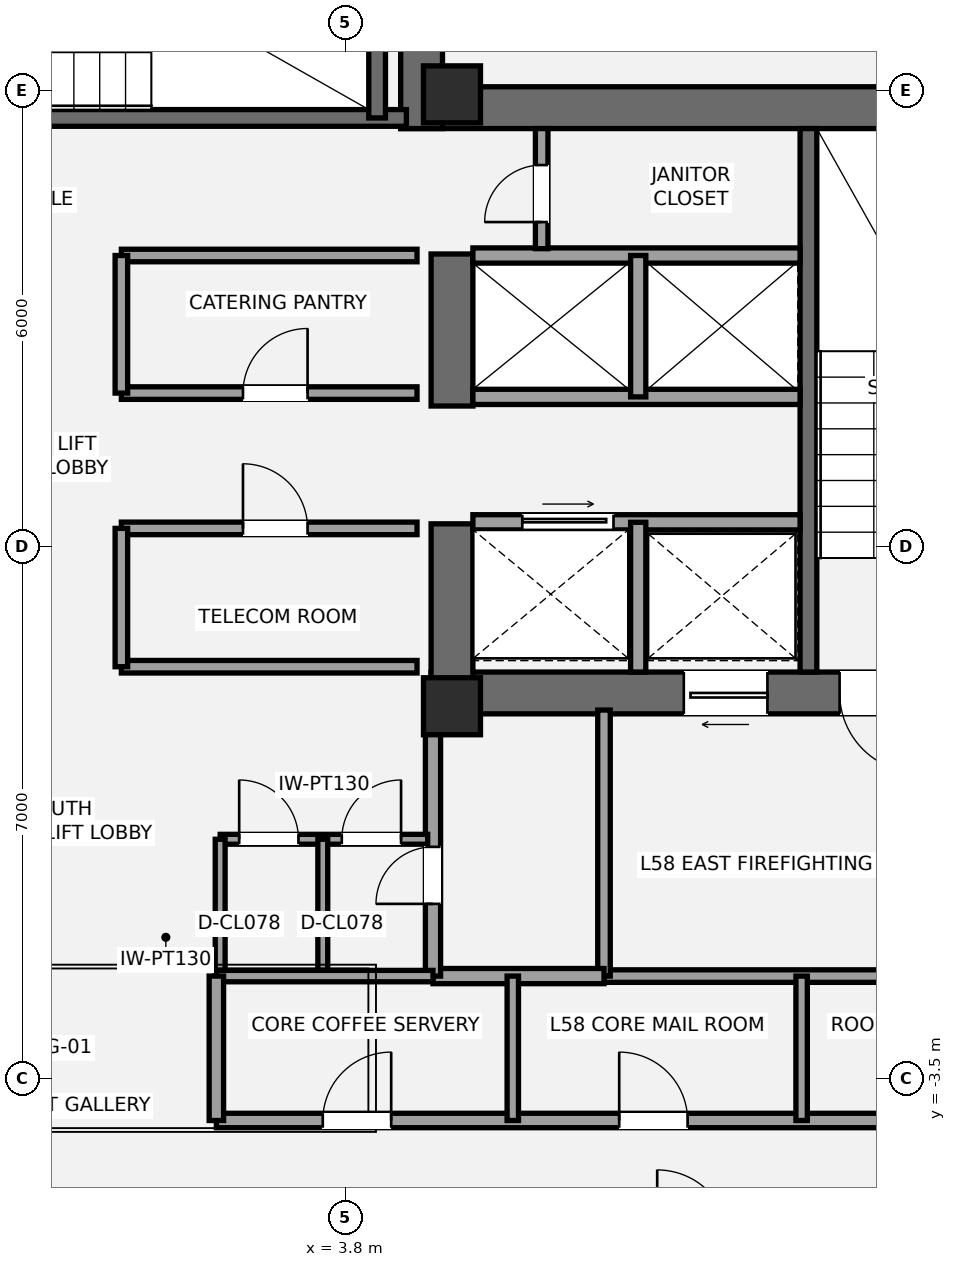
"""IFC4 building model, lengths in metres.
Left out: names, types, materials, properties, quantities, classifications, styles, units other than length and angle.
Written with IfcOpenShell. Run it as: python <this file> out.ifc"""

import sys

from ifc_helpers import new_model, si_unit, direction, frame, frame_2d, origin, origin_2d, place, context, subcontext, project, spatial, rectangle, extrude, element, fill, save


model = new_model("IFC4")
c1 = context("Model", 3, precision=1e-05, world=origin(), true_north=direction((0.0, 1.0)))
c2 = subcontext(c1, "Body", "Model", "MODEL_VIEW")
j1 = project(units=[si_unit("LENGTHUNIT", "METRE"), si_unit("PLANEANGLEUNIT", "RADIAN")], contexts=[c1])
p1 = place(None, origin())
s1 = spatial("IfcSite", under=j1, at=p1, CompositionType="ELEMENT")
p2 = place(p1, origin())
s2 = spatial("IfcBuilding", under=s1, at=p2, CompositionType="ELEMENT")
p3 = place(p2, frame((0.0, 0.0, 210.0)))
s3 = spatial("IfcBuildingStorey", under=s2, at=p3, CompositionType="ELEMENT", Elevation=210.0)
p4 = place(p3, frame((4.525, 9.275, 0.0), z_axis=(0.0, 0.0, 1.0), x_axis=(1.0, 0.0, 0.0)))
e1 = element("IfcWall", 1, at=p4, inside=s3, PredefinedType="SHEAR", context=c2, shape_type="SweptSolid", body=[
    extrude(rectangle(XDim=9.175, YDim=0.55, at=frame_2d((4.587, 0.0))), origin(), (0.0, 0.0, 1.0), 3.15),
])
p5 = place(p3, frame((13.7, 1.575, 0.0), z_axis=(0.0, 0.0, 1.0), x_axis=(-1.0, 0.0, 0.0)))
e2 = element("IfcWall", 2, at=p5, inside=s3, PredefinedType="SHEAR", context=c2, shape_type="SweptSolid", body=[
    extrude(rectangle(XDim=8.775, YDim=0.55, at=frame_2d((4.387, 0.0))), origin(), (0.0, 0.0, 1.0), 3.15),
])
p6 = place(p5, frame((2.35, 0.0, 0.0)))
e3 = element("IfcOpeningElement", 3, at=p6, cuts=e2, PredefinedType="OPENING", context=c2, shape_type="SweptSolid", body=[
    extrude(rectangle(XDim=1.05, YDim=2.15, at=frame_2d((0.525, 1.075))), frame((0.0, 0.285, 0.0), z_axis=(0.0, -1.0, 0.0), x_axis=(1.0, 0.0, 0.0)), (0.0, 0.0, 1.0), 0.57),
])
p7 = place(p5, frame((4.35, 0.0, 0.0)))
e4 = element("IfcOpeningElement", 4, at=p7, cuts=e2, PredefinedType="OPENING", context=c2, shape_type="SweptSolid", body=[
    extrude(rectangle(XDim=1.1, YDim=2.2, at=frame_2d((0.55, 1.1))), frame((0.0, 0.285, 0.0), z_axis=(0.0, -1.0, 0.0), x_axis=(1.0, 0.0, 0.0)), (0.0, 0.0, 1.0), 0.57),
])
p8 = place(p3, frame((5.2, 1.3, 0.0), z_axis=(0.0, 0.0, 1.0), x_axis=(0.0, 1.0, 0.0)))
e5 = element("IfcWall", 5, at=p8, inside=s3, PredefinedType="SHEAR", context=c2, shape_type="SweptSolid", body=[
    extrude(rectangle(XDim=2.5, YDim=0.55, at=frame_2d((1.25, 0.0))), origin(), (0.0, 0.0, 1.0), 3.15),
])
p9 = place(p3, frame((5.2, 5.35, 0.0), z_axis=(0.0, 0.0, 1.0), x_axis=(0.0, 1.0, 0.0)))
e6 = element("IfcWall", 6, at=p9, inside=s3, PredefinedType="SHEAR", context=c2, shape_type="SweptSolid", body=[
    extrude(rectangle(XDim=2.0, YDim=0.55, at=frame_2d((1.0, 0.0))), origin(), (0.0, 0.0, 1.0), 3.15),
])
p10 = place(p3, frame((9.89, 1.85, 0.0), z_axis=(0.0, 0.0, 1.0), x_axis=(0.0, 1.0, 0.0)))
e7 = element("IfcWall", 7, at=p10, inside=s3, PredefinedType="SHEAR", context=c2, shape_type="SweptSolid", body=[
    extrude(rectangle(XDim=7.15, YDim=0.22, at=frame_2d((3.575, 0.0))), origin(), (0.0, 0.0, 1.0), 3.15),
])
p11 = place(p3, frame((4.8, 9.0, 0.0), z_axis=(0.0, 0.0, 1.0), x_axis=(0.0, 1.0, 0.0)))
e8 = element("IfcWall", 8, at=p11, inside=s3, PredefinedType="SHEAR", context=c2, shape_type="SweptSolid", body=[
    extrude(rectangle(XDim=3.95, YDim=0.55, at=frame_2d((1.975, 0.0))), origin(), (0.0, 0.0, 1.0), 3.15),
])
p12 = place(p3, frame((-4.7, 9.14, 0.0), z_axis=(0.0, 0.0, 1.0), x_axis=(1.0, 0.0, 0.0)))
e9 = element("IfcWall", 9, at=p12, inside=s3, PredefinedType="SHEAR", context=c2, shape_type="SweptSolid", body=[
    extrude(rectangle(XDim=9.3, YDim=0.22, at=frame_2d((4.65, 0.0))), origin(), (0.0, 0.0, 1.0), 3.15),
])
p13 = place(p12, frame((1.15, 0.0, 0.0)))
e10 = element("IfcOpeningElement", 10, at=p13, cuts=e9, PredefinedType="OPENING", context=c2, shape_type="SweptSolid", body=[
    extrude(rectangle(XDim=1.05, YDim=2.15, at=frame_2d((0.525, 1.075))), frame((0.0, 0.12, 0.0), z_axis=(0.0, -1.0, 0.0), x_axis=(1.0, 0.0, 0.0)), (0.0, 0.0, 1.0), 0.24),
])
p14 = place(p3, frame((4.215, 9.14, 0.0), z_axis=(0.0, 0.0, 1.0), x_axis=(0.0, 1.0, 0.0)))
e11 = element("IfcWall", 11, at=p14, inside=s3, PredefinedType="SHEAR", context=c2, shape_type="SweptSolid", body=[
    extrude(rectangle(XDim=3.26, YDim=0.22, at=frame_2d((1.63, 0.0))), origin(), (0.0, 0.0, 1.0), 3.15),
])
for number, where, z_axis, x_axis in (
    (12, (5.2, 1.4, 0.0), (0.0, 0.0, 1.0), (1.0, 0.0, 0.0)),
    (13, (5.2, 9.45, 0.0), (0.0, 0.0, 1.0), (1.0, 0.0, 0.0)),
):
    element("IfcColumn", number, at=place(p3, frame(where, z_axis=z_axis, x_axis=x_axis)), inside=s3, PredefinedType="PILASTER", context=c2, shape_type="SweptSolid", body=[
        extrude(rectangle(XDim=0.75, YDim=0.75, at=origin_2d()), origin(), (0.0, 0.0, 1.0), 3.15),
    ])
p15 = place(p3, frame((7.2, -2.15, 0.0), z_axis=(0.0, 0.0, 1.0), x_axis=(1.0, 0.0, 0.0)))
e14 = element("IfcWall", 14, at=p15, inside=s3, PredefinedType="PARTITIONING", context=c2, shape_type="SweptSolid", body=[
    extrude(rectangle(XDim=6.25, YDim=0.165, at=frame_2d((3.125, 0.0))), origin(), (0.0, 0.0, 1.0), 2.97),
])
p16 = place(p3, frame((7.2, -2.15, 0.0), z_axis=(0.0, 0.0, 1.0), x_axis=(0.0, 1.0, 0.0)))
e15 = element("IfcWall", 15, at=p16, inside=s3, PredefinedType="PARTITIONING", context=c2, shape_type="SweptSolid", body=[
    extrude(rectangle(XDim=3.5, YDim=0.165, at=frame_2d((1.75, 0.0))), origin(), (0.0, 0.0, 1.0), 2.423),
])
p17 = place(p3, frame((4.95, -2.15, 0.0), z_axis=(0.0, 0.0, 1.0), x_axis=(1.0, 0.0, 0.0)))
e16 = element("IfcWall", 16, at=p17, inside=s3, PredefinedType="SOLIDWALL", context=c2, shape_type="SweptSolid", body=[
    extrude(rectangle(XDim=2.25, YDim=0.2, at=frame_2d((1.125, 0.0))), origin(), (0.0, 0.0, 1.0), 2.97),
])
p18 = place(p3, frame((4.95, -2.15, 0.0), z_axis=(0.0, 0.0, 1.0), x_axis=(0.0, 1.0, 0.0)))
e17 = element("IfcWall", 17, at=p18, inside=s3, PredefinedType="SOLIDWALL", context=c2, shape_type="SweptSolid", body=[
    extrude(rectangle(XDim=3.5, YDim=0.2, at=frame_2d((1.75, 0.0))), origin(), (0.0, 0.0, 1.0), 2.423),
])
p19 = place(p18, frame((0.95, 0.0, 0.0)))
e18 = element("IfcOpeningElement", 18, at=p19, cuts=e17, PredefinedType="OPENING", context=c2, shape_type="SweptSolid", body=[
    extrude(rectangle(XDim=0.75, YDim=2.1, at=frame_2d((0.375, 1.05))), frame((0.0, 0.11, 0.0), z_axis=(0.0, -1.0, 0.0), x_axis=(1.0, 0.0, 0.0)), (0.0, 0.0, 1.0), 0.22),
])
p20 = place(p3, frame((2.15, -0.35, 0.0), z_axis=(0.0, 0.0, 1.0), x_axis=(1.0, 0.0, 0.0)))
e19 = element("IfcWall", 19, at=p20, inside=s3, PredefinedType="PARTITIONING", context=c2, shape_type="SweptSolid", body=[
    extrude(rectangle(XDim=2.73, YDim=0.13, at=frame_2d((1.365, 0.0))), origin(), (0.0, 0.0, 1.0), 2.97),
])
p21 = place(p20, frame((0.25, 0.0, 0.0)))
e20 = element("IfcOpeningElement", 20, at=p21, cuts=e19, PredefinedType="OPENING", context=c2, shape_type="SweptSolid", body=[
    extrude(rectangle(XDim=0.78, YDim=2.1, at=frame_2d((0.39, 1.05))), frame((0.0, 0.075, 0.0), z_axis=(0.0, -1.0, 0.0), x_axis=(1.0, 0.0, 0.0)), (0.0, 0.0, 1.0), 0.15),
])
p22 = place(p20, frame((1.6, 0.0, 0.0)))
e21 = element("IfcOpeningElement", 21, at=p22, cuts=e19, PredefinedType="OPENING", context=c2, shape_type="SweptSolid", body=[
    extrude(rectangle(XDim=0.78, YDim=2.1, at=frame_2d((0.39, 1.05))), frame((0.0, 0.075, 0.0), z_axis=(0.0, -1.0, 0.0), x_axis=(1.0, 0.0, 0.0)), (0.0, 0.0, 1.0), 0.15),
])
for number, where, z_axis, x_axis in (
    (22, (2.15, -2.15, 0.0), (0.0, 0.0, 1.0), (0.0, 1.0, 0.0)),
    (23, (3.5, -2.15, 0.0), (0.0, 0.0, 1.0), (0.0, 1.0, 0.0)),
):
    element("IfcWall", number, at=place(p3, frame(where, z_axis=z_axis, x_axis=x_axis)), inside=s3, PredefinedType="PARTITIONING", context=c2, shape_type="SweptSolid", body=[
        extrude(rectangle(XDim=1.8, YDim=0.13, at=frame_2d((0.9, 0.0))), origin(), (0.0, 0.0, 1.0), 2.97),
    ])
p23 = place(p3, frame((5.475, 3.82, 0.0), z_axis=(0.0, 0.0, 1.0), x_axis=(1.0, 0.0, 0.0)))
e24 = element("IfcWall", 24, at=p23, inside=s3, PredefinedType="SOLIDWALL", context=c2, shape_type="SweptSolid", body=[
    extrude(rectangle(XDim=4.305, YDim=0.2, at=frame_2d((2.152, 0.0))), origin(), (0.0, 0.0, 1.0), 2.97),
])
p24 = place(p23, frame((0.65, 0.0, 0.0)))
e25 = element("IfcOpeningElement", 25, at=p24, cuts=e24, PredefinedType="OPENING", context=c2, shape_type="SweptSolid", body=[
    extrude(rectangle(XDim=1.2, YDim=2.2, at=frame_2d((0.6, 1.1))), frame((0.0, 0.11, 0.0), z_axis=(0.0, -1.0, 0.0), x_axis=(1.0, 0.0, 0.0)), (0.0, 0.0, 1.0), 0.22),
])
p25 = place(p3, frame((7.65, 1.85, 0.0), z_axis=(0.0, 0.0, 1.0), x_axis=(0.0, 1.0, 0.0)))
e26 = element("IfcWall", 26, at=p25, inside=s3, PredefinedType="SOLIDWALL", context=c2, shape_type="SweptSolid", body=[
    extrude(rectangle(XDim=1.97, YDim=0.2, at=frame_2d((0.985, 0.0))), origin(), (0.0, 0.0, 1.0), 2.97),
])
for number, where, z_axis, x_axis in (
    (27, (5.475, 5.47, 0.0), (0.0, 0.0, 1.0), (1.0, 0.0, 0.0)),
    (28, (5.475, 7.33, 0.0), (0.0, 0.0, 1.0), (1.0, 0.0, 0.0)),
):
    element("IfcWall", number, at=place(p3, frame(where, z_axis=z_axis, x_axis=x_axis)), inside=s3, PredefinedType="SOLIDWALL", context=c2, shape_type="SweptSolid", body=[
        extrude(rectangle(XDim=4.305, YDim=0.2, at=frame_2d((2.152, 0.0))), origin(), (0.0, 0.0, 1.0), 2.97),
    ])
p26 = place(p3, frame((7.65, 5.47, 0.0), z_axis=(0.0, 0.0, 1.0), x_axis=(0.0, 1.0, 0.0)))
e29 = element("IfcWall", 29, at=p26, inside=s3, PredefinedType="SOLIDWALL", context=c2, shape_type="SweptSolid", body=[
    extrude(rectangle(XDim=1.86, YDim=0.2, at=frame_2d((0.93, 0.0))), origin(), (0.0, 0.0, 1.0), 2.97),
])
p27 = place(p3, frame((0.85, 1.92, 0.0), z_axis=(0.0, 0.0, 1.0), x_axis=(1.0, 0.0, 0.0)))
e30 = element("IfcWall", 30, at=p27, inside=s3, PredefinedType="PARTITIONING", context=c2, shape_type="SweptSolid", body=[
    extrude(rectangle(XDim=3.89, YDim=0.165, at=frame_2d((1.945, 0.0))), origin(), (0.0, 0.0, 1.0), 2.11),
])
p28 = place(p3, frame((0.85, 3.74, 0.0), z_axis=(0.0, 0.0, 1.0), x_axis=(1.0, 0.0, 0.0)))
e31 = element("IfcWall", 31, at=p28, inside=s3, PredefinedType="PARTITIONING", context=c2, shape_type="SweptSolid", body=[
    extrude(rectangle(XDim=3.89, YDim=0.165, at=frame_2d((1.945, 0.0))), origin(), (0.0, 0.0, 1.0), 2.97),
])
p29 = place(p28, frame((1.6, 0.0, 0.0)))
e32 = element("IfcOpeningElement", 32, at=p29, cuts=e31, PredefinedType="OPENING", context=c2, shape_type="SweptSolid", body=[
    extrude(rectangle(XDim=0.85, YDim=2.1, at=frame_2d((0.425, 1.05))), frame((0.0, 0.093, 0.0), z_axis=(0.0, -1.0, 0.0), x_axis=(1.0, 0.0, 0.0)), (0.0, 0.0, 1.0), 0.185),
])
p30 = place(p3, frame((0.85, 1.92, 0.0), z_axis=(0.0, 0.0, 1.0), x_axis=(0.0, 1.0, 0.0)))
e33 = element("IfcWall", 33, at=p30, inside=s3, PredefinedType="PARTITIONING", context=c2, shape_type="SweptSolid", body=[
    extrude(rectangle(XDim=1.82, YDim=0.165, at=frame_2d((0.91, 0.0))), origin(), (0.0, 0.0, 1.0), 2.97),
])
p31 = place(p3, frame((0.85, 5.52, 0.0), z_axis=(0.0, 0.0, 1.0), x_axis=(1.0, 0.0, 0.0)))
e34 = element("IfcWall", 34, at=p31, inside=s3, PredefinedType="PARTITIONING", context=c2, shape_type="SweptSolid", body=[
    extrude(rectangle(XDim=3.89, YDim=0.165, at=frame_2d((1.945, 0.0))), origin(), (0.0, 0.0, 1.0), 2.97),
])
p32 = place(p31, frame((1.6, 0.0, 0.0)))
e35 = element("IfcOpeningElement", 35, at=p32, cuts=e34, PredefinedType="OPENING", context=c2, shape_type="SweptSolid", body=[
    extrude(rectangle(XDim=0.85, YDim=2.1, at=frame_2d((0.425, 1.05))), frame((0.0, 0.093, 0.0), z_axis=(0.0, -1.0, 0.0), x_axis=(1.0, 0.0, 0.0)), (0.0, 0.0, 1.0), 0.185),
])
p33 = place(p3, frame((0.85, 7.33, 0.0), z_axis=(0.0, 0.0, 1.0), x_axis=(1.0, 0.0, 0.0)))
e36 = element("IfcWall", 36, at=p33, inside=s3, PredefinedType="PARTITIONING", context=c2, shape_type="SweptSolid", body=[
    extrude(rectangle(XDim=3.89, YDim=0.165, at=frame_2d((1.945, 0.0))), origin(), (0.0, 0.0, 1.0), 2.97),
])
p34 = place(p3, frame((0.85, 5.52, 0.0), z_axis=(0.0, 0.0, 1.0), x_axis=(0.0, 1.0, 0.0)))
e37 = element("IfcWall", 37, at=p34, inside=s3, PredefinedType="PARTITIONING", context=c2, shape_type="SweptSolid", body=[
    extrude(rectangle(XDim=1.81, YDim=0.165, at=frame_2d((0.905, 0.0))), origin(), (0.0, 0.0, 1.0), 2.97),
])
p35 = place(p3, frame((6.38, 7.42, 0.0), z_axis=(0.0, 0.0, 1.0), x_axis=(0.0, 1.0, 0.0)))
e38 = element("IfcWall", 38, at=p35, inside=s3, PredefinedType="PARTITIONING", context=c2, shape_type="SweptSolid", body=[
    extrude(rectangle(XDim=1.58, YDim=0.165, at=frame_2d((0.79, 0.0))), origin(), (0.0, 0.0, 1.0), 2.97),
])
p36 = place(p35, frame((0.35, 0.0, 0.0)))
e39 = element("IfcOpeningElement", 39, at=p36, cuts=e38, PredefinedType="OPENING", context=c2, shape_type="SweptSolid", body=[
    extrude(rectangle(XDim=0.75, YDim=2.1, at=frame_2d((0.375, 1.05))), frame((0.0, 0.093, 0.0), z_axis=(0.0, -1.0, 0.0), x_axis=(1.0, 0.0, 0.0)), (0.0, 0.0, 1.0), 0.185),
])
p37 = place(p3, frame((2.1, -4.05, 0.0), z_axis=(0.0, 0.0, 1.0), x_axis=(1.0, 0.0, 0.0)))
e40 = element("IfcWall", 40, at=p37, inside=s3, PredefinedType="PLUMBINGWALL", context=c2, shape_type="SweptSolid", body=[
    extrude(rectangle(XDim=11.35, YDim=0.19, at=frame_2d((5.675, 0.0))), origin(), (0.0, 0.0, 1.0), 2.357),
])
p38 = place(p37, frame((1.4, 0.0, 0.0)))
e41 = element("IfcOpeningElement", 41, at=p38, cuts=e40, PredefinedType="OPENING", context=c2, shape_type="SweptSolid", body=[
    extrude(rectangle(XDim=0.9, YDim=2.1, at=frame_2d((0.45, 1.05))), frame((0.0, 0.105, 0.0), z_axis=(0.0, -1.0, 0.0), x_axis=(1.0, 0.0, 0.0)), (0.0, 0.0, 1.0), 0.21),
])
p39 = place(p37, frame((5.3, 0.0, 0.0)))
e42 = element("IfcOpeningElement", 42, at=p39, cuts=e40, PredefinedType="OPENING", context=c2, shape_type="SweptSolid", body=[
    extrude(rectangle(XDim=0.9, YDim=2.1, at=frame_2d((0.45, 1.05))), frame((0.0, 0.105, 0.0), z_axis=(0.0, -1.0, 0.0), x_axis=(1.0, 0.0, 0.0)), (0.0, 0.0, 1.0), 0.21),
])
p40 = place(p37, frame((9.1, 0.0, 0.0)))
e43 = element("IfcOpeningElement", 43, at=p40, cuts=e40, PredefinedType="OPENING", context=c2, shape_type="SweptSolid", body=[
    extrude(rectangle(XDim=0.9, YDim=2.1, at=frame_2d((0.45, 1.05))), frame((0.0, 0.105, 0.0), z_axis=(0.0, -1.0, 0.0), x_axis=(1.0, 0.0, 0.0)), (0.0, 0.0, 1.0), 0.21),
])
p41 = place(p3, frame((2.1, -2.15, 0.0), z_axis=(0.0, 0.0, 1.0), x_axis=(1.0, 0.0, 0.0)))
e44 = element("IfcWall", 44, at=p41, inside=s3, PredefinedType="PLUMBINGWALL", context=c2, shape_type="SweptSolid", body=[
    extrude(rectangle(XDim=2.85, YDim=0.15, at=frame_2d((1.425, 0.0))), origin(), (0.0, 0.0, 1.0), 2.97),
])
p42 = place(p3, frame((2.1, -4.05, 0.0), z_axis=(0.0, 0.0, 1.0), x_axis=(0.0, 1.0, 0.0)))
e45 = element("IfcWall", 45, at=p42, inside=s3, PredefinedType="PLUMBINGWALL", context=c2, shape_type="SweptSolid", body=[
    extrude(rectangle(XDim=1.9, YDim=0.19, at=frame_2d((0.95, 0.0))), origin(), (0.0, 0.0, 1.0), 2.97),
])
p43 = place(p3, frame((6.0, -4.05, 0.0), z_axis=(0.0, 0.0, 1.0), x_axis=(0.0, 1.0, 0.0)))
e46 = element("IfcWall", 46, at=p43, inside=s3, PredefinedType="PLUMBINGWALL", context=c2, shape_type="SweptSolid", body=[
    extrude(rectangle(XDim=1.9, YDim=0.15, at=frame_2d((0.95, 0.0))), origin(), (0.0, 0.0, 1.0), 2.431),
])
p44 = place(p3, frame((9.8, -4.05, 0.0), z_axis=(0.0, 0.0, 1.0), x_axis=(0.0, 1.0, 0.0)))
e47 = element("IfcWall", 47, at=p44, inside=s3, PredefinedType="PLUMBINGWALL", context=c2, shape_type="SweptSolid", body=[
    extrude(rectangle(XDim=1.9, YDim=0.15, at=frame_2d((0.95, 0.0))), origin(), (0.0, 0.0, 1.0), 2.97),
])
p45 = place(p6, origin())
e48 = element("IfcDoor", 48, at=p45, inside=s3, OperationType="SINGLE_SWING_LEFT", PredefinedType="DOOR", context=c2, shape_type="SweptSolid", body=[
    extrude(rectangle(XDim=1.05, YDim=2.15, at=frame_2d((0.525, 1.075))), frame((0.0, 0.025, 0.0), z_axis=(0.0, -1.0, 0.0), x_axis=(1.0, 0.0, 0.0)), (0.0, 0.0, 1.0), 0.05),
])
fill(e3, e48)
p46 = place(p19, origin())
e49 = element("IfcDoor", 49, at=p46, inside=s3, OperationType="SINGLE_SWING_LEFT", PredefinedType="DOOR", context=c2, shape_type="SweptSolid", body=[
    extrude(rectangle(XDim=0.75, YDim=2.1, at=frame_2d((0.375, 1.05))), frame((0.0, 0.025, 0.0), z_axis=(0.0, -1.0, 0.0), x_axis=(1.0, 0.0, 0.0)), (0.0, 0.0, 1.0), 0.05),
])
fill(e18, e49)
p47 = place(p21, origin())
e50 = element("IfcDoor", 50, at=p47, inside=s3, OperationType="SINGLE_SWING_LEFT", PredefinedType="DOOR", context=c2, shape_type="SweptSolid", body=[
    extrude(rectangle(XDim=0.78, YDim=2.1, at=frame_2d((0.39, 1.05))), frame((0.0, 0.025, 0.0), z_axis=(0.0, -1.0, 0.0), x_axis=(1.0, 0.0, 0.0)), (0.0, 0.0, 1.0), 0.05),
])
fill(e20, e50)
p48 = place(p22, origin())
e51 = element("IfcDoor", 51, at=p48, inside=s3, OperationType="SINGLE_SWING_RIGHT", PredefinedType="DOOR", context=c2, shape_type="SweptSolid", body=[
    extrude(rectangle(XDim=0.78, YDim=2.1, at=frame_2d((0.39, 1.05))), frame((0.0, 0.025, 0.0), z_axis=(0.0, -1.0, 0.0), x_axis=(1.0, 0.0, 0.0)), (0.0, 0.0, 1.0), 0.05),
])
fill(e21, e51)
p49 = place(p7, origin())
e52 = element("IfcDoor", 52, at=p49, inside=s3, OperationType="SLIDING_TO_LEFT", PredefinedType="DOOR", context=c2, shape_type="SweptSolid", body=[
    extrude(rectangle(XDim=1.1, YDim=2.2, at=frame_2d((0.55, 1.1))), frame((0.0, 0.025, 0.0), z_axis=(0.0, -1.0, 0.0), x_axis=(1.0, 0.0, 0.0)), (0.0, 0.0, 1.0), 0.05),
])
fill(e4, e52)
p50 = place(p24, origin())
e53 = element("IfcDoor", 53, at=p50, inside=s3, OperationType="SLIDING_TO_RIGHT", PredefinedType="DOOR", context=c2, shape_type="SweptSolid", body=[
    extrude(rectangle(XDim=1.2, YDim=2.2, at=frame_2d((0.6, 1.1))), frame((0.0, 0.025, 0.0), z_axis=(0.0, -1.0, 0.0), x_axis=(1.0, 0.0, 0.0)), (0.0, 0.0, 1.0), 0.05),
])
fill(e25, e53)
p51 = place(p29, origin())
e54 = element("IfcDoor", 54, at=p51, inside=s3, OperationType="SINGLE_SWING_LEFT", PredefinedType="DOOR", context=c2, shape_type="SweptSolid", body=[
    extrude(rectangle(XDim=0.85, YDim=2.1, at=frame_2d((0.425, 1.05))), frame((0.0, 0.025, 0.0), z_axis=(0.0, -1.0, 0.0), x_axis=(1.0, 0.0, 0.0)), (0.0, 0.0, 1.0), 0.05),
])
fill(e32, e54)
p52 = place(p32, origin())
e55 = element("IfcDoor", 55, at=p52, inside=s3, OperationType="SINGLE_SWING_RIGHT", PredefinedType="DOOR", context=c2, shape_type="SweptSolid", body=[
    extrude(rectangle(XDim=0.85, YDim=2.1, at=frame_2d((0.425, 1.05))), frame((0.0, 0.025, 0.0), z_axis=(0.0, -1.0, 0.0), x_axis=(1.0, 0.0, 0.0)), (0.0, 0.0, 1.0), 0.05),
])
fill(e35, e55)
p53 = place(p36, origin())
e56 = element("IfcDoor", 56, at=p53, inside=s3, OperationType="SINGLE_SWING_LEFT", PredefinedType="DOOR", context=c2, shape_type="SweptSolid", body=[
    extrude(rectangle(XDim=0.75, YDim=2.1, at=frame_2d((0.375, 1.05))), frame((0.0, 0.025, 0.0), z_axis=(0.0, -1.0, 0.0), x_axis=(1.0, 0.0, 0.0)), (0.0, 0.0, 1.0), 0.05),
])
fill(e39, e56)
p54 = place(p38, origin())
e57 = element("IfcDoor", 57, at=p54, inside=s3, OperationType="SINGLE_SWING_RIGHT", PredefinedType="DOOR", context=c2, shape_type="SweptSolid", body=[
    extrude(rectangle(XDim=0.9, YDim=2.1, at=frame_2d((0.45, 1.05))), frame((0.0, 0.025, 0.0), z_axis=(0.0, -1.0, 0.0), x_axis=(1.0, 0.0, 0.0)), (0.0, 0.0, 1.0), 0.05),
])
fill(e41, e57)
p55 = place(p39, origin())
e58 = element("IfcDoor", 58, at=p55, inside=s3, OperationType="SINGLE_SWING_LEFT", PredefinedType="DOOR", context=c2, shape_type="SweptSolid", body=[
    extrude(rectangle(XDim=0.9, YDim=2.1, at=frame_2d((0.45, 1.05))), frame((0.0, 0.025, 0.0), z_axis=(0.0, -1.0, 0.0), x_axis=(1.0, 0.0, 0.0)), (0.0, 0.0, 1.0), 0.05),
])
fill(e42, e58)
save(model, sys.argv[1])
